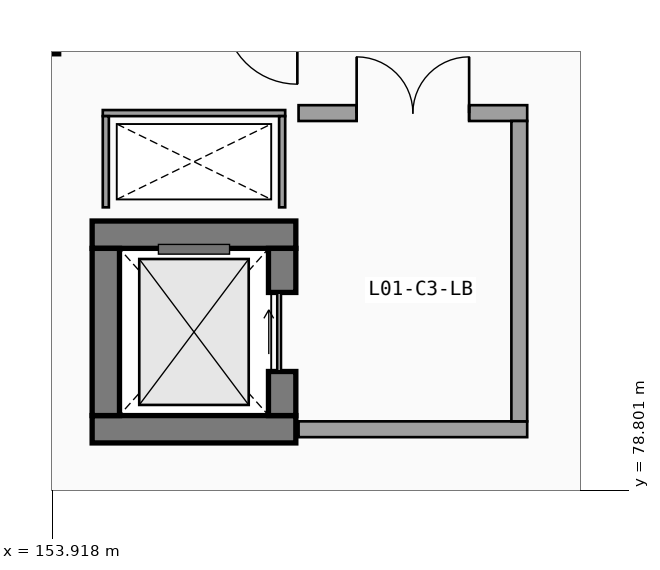
"""IFC4 building model, lengths in metres.
Left out: names, types, materials, properties, quantities, classifications, styles, units other than length and angle.
Written with IfcOpenShell. Run it as: python <this file> out.ifc"""

import sys

from ifc_helpers import new_model, si_unit, direction, frame, frame_2d, origin, origin_2d, place, context, subcontext, project, spatial, rectangle, extrude, element, fill, save


model = new_model("IFC4")
c1 = context("Model", 3, precision=1e-05, world=origin(), true_north=direction((0.0, 1.0)))
c2 = subcontext(c1, "Body", "Model", "MODEL_VIEW")
j1 = project(units=[si_unit("LENGTHUNIT", "METRE"), si_unit("PLANEANGLEUNIT", "RADIAN")], contexts=[c1])
p1 = place(None, origin())
s1 = spatial("IfcSite", under=j1, at=p1, CompositionType="ELEMENT")
p2 = place(p1, origin())
s2 = spatial("IfcBuilding", under=s1, at=p2, CompositionType="ELEMENT")
p3 = place(p2, frame((0.0, 0.0, 4.8)))
s3 = spatial("IfcBuildingStorey", under=s2, at=p3, CompositionType="ELEMENT", Elevation=4.8)
p4 = place(p3, frame((153.6, 86.4, 0.0), z_axis=(0.0, 0.0, 1.0), x_axis=(1.0, 0.0, 0.0)))
e1 = element("IfcColumn", 1, at=p4, inside=s3, PredefinedType="COLUMN", context=c2, shape_type="SweptSolid", body=[
    extrude(rectangle(XDim=0.85, YDim=0.85, at=origin_2d()), origin(), (0.0, 0.0, 1.0), 4.8),
])
for number, where, z_axis, x_axis in (
    (2, (154.575, 79.8, 0.0), (0.0, 0.0, 1.0), (1.0, 0.0, 0.0)),
    (3, (157.925, 83.0, 0.0), (0.0, 0.0, 1.0), (-1.0, 0.0, 0.0)),
):
    element("IfcWall", number, at=place(p3, frame(where, z_axis=z_axis, x_axis=x_axis)), inside=s3, PredefinedType="SHEAR", context=c2, shape_type="SweptSolid", body=[
        extrude(rectangle(XDim=3.35, YDim=0.45, at=frame_2d((1.675, 0.0))), origin(), (0.0, 0.0, 1.0), 4.52),
    ])
p5 = place(p3, frame((154.8, 82.775, 0.0), z_axis=(0.0, 0.0, 1.0), x_axis=(0.0, -1.0, 0.0)))
e4 = element("IfcWall", 4, at=p5, inside=s3, PredefinedType="SHEAR", context=c2, shape_type="SweptSolid", body=[
    extrude(rectangle(XDim=2.75, YDim=0.45, at=frame_2d((1.375, 0.0))), origin(), (0.0, 0.0, 1.0), 4.52),
])
p6 = place(p3, frame((157.7, 80.025, 0.0), z_axis=(0.0, 0.0, 1.0), x_axis=(0.0, 1.0, 0.0)))
e5 = element("IfcWall", 5, at=p6, inside=s3, PredefinedType="SHEAR", context=c2, shape_type="SweptSolid", body=[
    extrude(rectangle(XDim=2.75, YDim=0.45, at=frame_2d((1.375, 0.0))), origin(), (0.0, 0.0, 1.0), 4.52),
])
p7 = place(p6, frame((0.725, 0.0, 0.0), z_axis=(0.0, 0.0, 1.0), x_axis=(1.0, 0.0, 0.0)))
e6 = element("IfcOpeningElement", 6, at=p7, cuts=e5, PredefinedType="OPENING", context=c2, shape_type="SweptSolid", body=[
    extrude(rectangle(XDim=1.3, YDim=2.25, at=frame_2d((0.65, 1.125))), frame((0.0, 0.235, 0.0), z_axis=(0.0, -1.0, 0.0), x_axis=(1.0, 0.0, 0.0)), (0.0, 0.0, 1.0), 0.47),
])
p8 = place(p3, frame((157.75, 85.0, 0.0), z_axis=(0.0, 0.0, 1.0), x_axis=(-1.0, 0.0, 0.0)))
e7 = element("IfcWall", 7, at=p8, inside=s3, PredefinedType="PARTITIONING", context=c2, shape_type="SweptSolid", body=[
    extrude(rectangle(XDim=3.0, YDim=0.1, at=frame_2d((1.5, 0.0))), origin(), (0.0, 0.0, 1.0), 4.52),
])
for number, where, z_axis, x_axis in (
    (8, (154.8, 84.95, 0.0), (0.0, 0.0, 1.0), (0.0, -1.0, 0.0)),
    (9, (157.7, 83.45, 0.0), (0.0, 0.0, 1.0), (0.0, 1.0, 0.0)),
):
    element("IfcWall", number, at=place(p3, frame(where, z_axis=z_axis, x_axis=x_axis)), inside=s3, PredefinedType="PARTITIONING", context=c2, shape_type="SweptSolid", body=[
        extrude(rectangle(XDim=1.5, YDim=0.1, at=frame_2d((0.75, 0.0))), origin(), (0.0, 0.0, 1.0), 4.52),
    ])
p9 = place(p3, frame((157.97, 79.8, 0.0), z_axis=(0.0, 0.0, 1.0), x_axis=(1.0, 0.0, 0.0)))
e10 = element("IfcWall", 10, at=p9, inside=s3, PredefinedType="SOLIDWALL", context=c2, shape_type="SweptSolid", body=[
    extrude(rectangle(XDim=3.76, YDim=0.26, at=frame_2d((1.88, 0.0))), origin(), (0.0, 0.0, 1.0), 4.52),
])
p10 = place(p3, frame((161.73, 85.0, 0.0), z_axis=(0.0, 0.0, 1.0), x_axis=(-1.0, 0.0, 0.0)))
e11 = element("IfcWall", 11, at=p10, inside=s3, PredefinedType="SOLIDWALL", context=c2, shape_type="SweptSolid", body=[
    extrude(rectangle(XDim=3.76, YDim=0.26, at=frame_2d((1.88, 0.0))), origin(), (0.0, 0.0, 1.0), 4.52),
])
p11 = place(p10, frame((2.805, 0.0, 0.0), z_axis=(0.0, 0.0, 1.0), x_axis=(-1.0, 0.0, 0.0)))
e12 = element("IfcOpeningElement", 12, at=p11, cuts=e11, PredefinedType="OPENING", context=c2, shape_type="SweptSolid", body=[
    extrude(rectangle(XDim=1.85, YDim=2.25, at=frame_2d((0.925, 1.125))), frame((0.0, 0.14, 0.0), z_axis=(0.0, -1.0, 0.0), x_axis=(1.0, 0.0, 0.0)), (0.0, 0.0, 1.0), 0.28),
])
p12 = place(p3, frame((161.6, 79.93, 0.0), z_axis=(0.0, 0.0, 1.0), x_axis=(0.0, 1.0, 0.0)))
e13 = element("IfcWall", 13, at=p12, inside=s3, PredefinedType="SOLIDWALL", context=c2, shape_type="SweptSolid", body=[
    extrude(rectangle(XDim=4.94, YDim=0.26, at=frame_2d((2.47, 0.0))), origin(), (0.0, 0.0, 1.0), 4.52),
])
p13 = place(p7, origin())
e14 = element("IfcDoor", 14, at=p13, inside=s3, OperationType="SLIDING_TO_RIGHT", PredefinedType="DOOR", context=c2, shape_type="SweptSolid", body=[
    extrude(rectangle(XDim=1.3, YDim=2.25, at=frame_2d((0.65, 1.125))), frame((0.0, 0.025, 0.0), z_axis=(0.0, -1.0, 0.0), x_axis=(1.0, 0.0, 0.0)), (0.0, 0.0, 1.0), 0.05),
])
fill(e6, e14)
p14 = place(p11, origin())
e15 = element("IfcDoor", 15, at=p14, inside=s3, OperationType="DOUBLE_DOOR_SINGLE_SWING", PredefinedType="DOOR", context=c2, shape_type="SweptSolid", body=[
    extrude(rectangle(XDim=1.85, YDim=2.25, at=frame_2d((0.925, 1.125))), frame((0.0, 0.025, 0.0), z_axis=(0.0, -1.0, 0.0), x_axis=(1.0, 0.0, 0.0)), (0.0, 0.0, 1.0), 0.05),
])
fill(e12, e15)
save(model, sys.argv[1])
